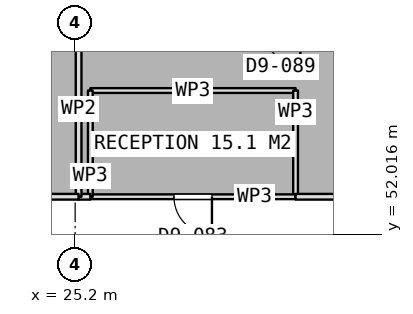
"""IFC4 building model, lengths in metres.
Left out: names, types, materials, properties, quantities, classifications, styles, units other than length and angle.
Written with IfcOpenShell. Run it as: python <this file> out.ifc"""

import sys

from ifc_helpers import new_model, si_unit, direction, frame, frame_2d, origin, place, context, subcontext, project, spatial, rectangle, extrude, element, fill, save


model = new_model("IFC4")
c1 = context("Model", 3, precision=1e-05, world=origin(), true_north=direction((0.0, 1.0)))
c2 = subcontext(c1, "Body", "Model", "MODEL_VIEW")
j1 = project(units=[si_unit("LENGTHUNIT", "METRE"), si_unit("PLANEANGLEUNIT", "RADIAN")], contexts=[c1])
p1 = place(None, origin())
s1 = spatial("IfcSite", under=j1, at=p1, CompositionType="ELEMENT")
p2 = place(p1, origin())
s2 = spatial("IfcBuilding", under=s1, at=p2, CompositionType="ELEMENT")
p3 = place(p2, frame((0.0, 0.0, 36.65)))
s3 = spatial("IfcBuildingStorey", under=s2, at=p3, CompositionType="ELEMENT", Elevation=36.65)
p4 = place(p3, frame((25.6, 55.795, 0.0), z_axis=(0.0, 0.0, 1.0), x_axis=(1.0, 0.0, 0.0)))
e1 = element("IfcWall", 1, at=p4, inside=s3, PredefinedType="PARTITIONING", context=c2, shape_type="SweptSolid", body=[
    extrude(rectangle(XDim=5.4, YDim=0.125, at=frame_2d((2.7, 0.0))), origin(), (0.0, 0.0, 1.0), 3.5),
])
p5 = place(p3, frame((31.0, 55.795, 0.0), z_axis=(0.0, 0.0, 1.0), x_axis=(0.0, -1.0, 0.0)))
e2 = element("IfcWall", 2, at=p5, inside=s3, PredefinedType="PARTITIONING", context=c2, shape_type="SweptSolid", body=[
    extrude(rectangle(XDim=2.795, YDim=0.125, at=frame_2d((1.397, 0.0))), origin(), (0.0, 0.0, 1.0), 3.5),
])
p6 = place(p3, frame((31.0, 53.0, 0.0), z_axis=(0.0, 0.0, 1.0), x_axis=(-1.0, 0.0, 0.0)))
e3 = element("IfcWall", 3, at=p6, inside=s3, PredefinedType="PARTITIONING", context=c2, shape_type="SweptSolid", body=[
    extrude(rectangle(XDim=5.4, YDim=0.125, at=frame_2d((2.7, 0.0))), origin(), (0.0, 0.0, 1.0), 3.5),
])
p7 = place(p6, frame((2.2, 0.0, 0.0)))
e4 = element("IfcOpeningElement", 4, at=p7, cuts=e3, PredefinedType="OPENING", context=c2, shape_type="SweptSolid", body=[
    extrude(rectangle(XDim=1.0, YDim=2.1, at=frame_2d((0.5, 1.05))), frame((0.0, 0.073, 0.0), z_axis=(0.0, -1.0, 0.0), x_axis=(1.0, 0.0, 0.0)), (0.0, 0.0, 1.0), 0.145),
])
p8 = place(p3, frame((25.6, 53.0, 0.0), z_axis=(0.0, 0.0, 1.0), x_axis=(0.0, 1.0, 0.0)))
e5 = element("IfcWall", 5, at=p8, inside=s3, PredefinedType="PARTITIONING", context=c2, shape_type="SweptSolid", body=[
    extrude(rectangle(XDim=2.795, YDim=0.125, at=frame_2d((1.397, 0.0))), origin(), (0.0, 0.0, 1.0), 3.5),
])
p9 = place(p3, frame((36.3, 53.0, 0.0), z_axis=(0.0, 0.0, 1.0), x_axis=(-1.0, 0.0, 0.0)))
e6 = element("IfcWall", 6, at=p9, inside=s3, PredefinedType="PARTITIONING", context=c2, shape_type="SweptSolid", body=[
    extrude(rectangle(XDim=5.3, YDim=0.15, at=frame_2d((2.65, 0.0))), origin(), (0.0, 0.0, 1.0), 3.5),
])
p10 = place(p3, frame((25.6, 53.0, 0.0), z_axis=(0.0, 0.0, 1.0), x_axis=(-1.0, 0.0, 0.0)))
e7 = element("IfcWall", 7, at=p10, inside=s3, PredefinedType="PARTITIONING", context=c2, shape_type="SweptSolid", body=[
    extrude(rectangle(XDim=0.309, YDim=0.15, at=frame_2d((0.155, 0.0))), origin(), (0.0, 0.0, 1.0), 3.5),
])
p11 = place(p3, frame((25.291, 53.0, 0.0), z_axis=(0.0, 0.0, 1.0), x_axis=(0.0, 1.0, 0.0)))
e8 = element("IfcWall", 8, at=p11, inside=s3, PredefinedType="PARTITIONING", context=c2, shape_type="SweptSolid", body=[
    extrude(rectangle(XDim=4.613, YDim=0.15, at=frame_2d((2.307, 0.0))), origin(), (0.0, 0.0, 1.0), 3.5),
])
p12 = place(p3, frame((25.331, 57.68, 0.0), z_axis=(0.0, 0.0, 1.0), x_axis=(-0.995411812081, -0.095683459231, 0.0)))
e9 = element("IfcWall", 9, at=p12, inside=s3, PredefinedType="PARTITIONING", context=c2, shape_type="SweptSolid", body=[
    extrude(rectangle(XDim=9.803, YDim=0.125, at=frame_2d((4.901, 0.0))), origin(), (0.0, 0.0, 1.0), 3.5),
])
p13 = place(p12, frame((4.768, 0.0, 0.0)))
e10 = element("IfcOpeningElement", 10, at=p13, cuts=e9, PredefinedType="OPENING", context=c2, shape_type="SweptSolid", body=[
    extrude(rectangle(XDim=1.0, YDim=2.1, at=frame_2d((0.5, 1.05))), frame((0.0, 0.073, 0.0), z_axis=(0.0, -1.0, 0.0), x_axis=(1.0, 0.0, 0.0)), (0.0, 0.0, 1.0), 0.145),
])
p14 = place(p3, frame((25.29, 53.0, 0.0), z_axis=(0.0, 0.0, 1.0), x_axis=(-1.0, 0.0, 0.0)))
e11 = element("IfcWall", 11, at=p14, inside=s3, PredefinedType="PARTITIONING", context=c2, shape_type="SweptSolid", body=[
    extrude(rectangle(XDim=2.89, YDim=0.15, at=frame_2d((1.445, 0.0))), origin(), (0.0, 0.0, 1.0), 3.5),
])
p15 = place(p7, origin())
e12 = element("IfcDoor", 12, at=p15, inside=s3, OperationType="SINGLE_SWING_LEFT", PredefinedType="DOOR", context=c2, shape_type="SweptSolid", body=[
    extrude(rectangle(XDim=1.0, YDim=2.1, at=frame_2d((0.5, 1.05))), frame((0.0, 0.025, 0.0), z_axis=(0.0, -1.0, 0.0), x_axis=(1.0, 0.0, 0.0)), (0.0, 0.0, 1.0), 0.05),
])
fill(e4, e12)
save(model, sys.argv[1])
